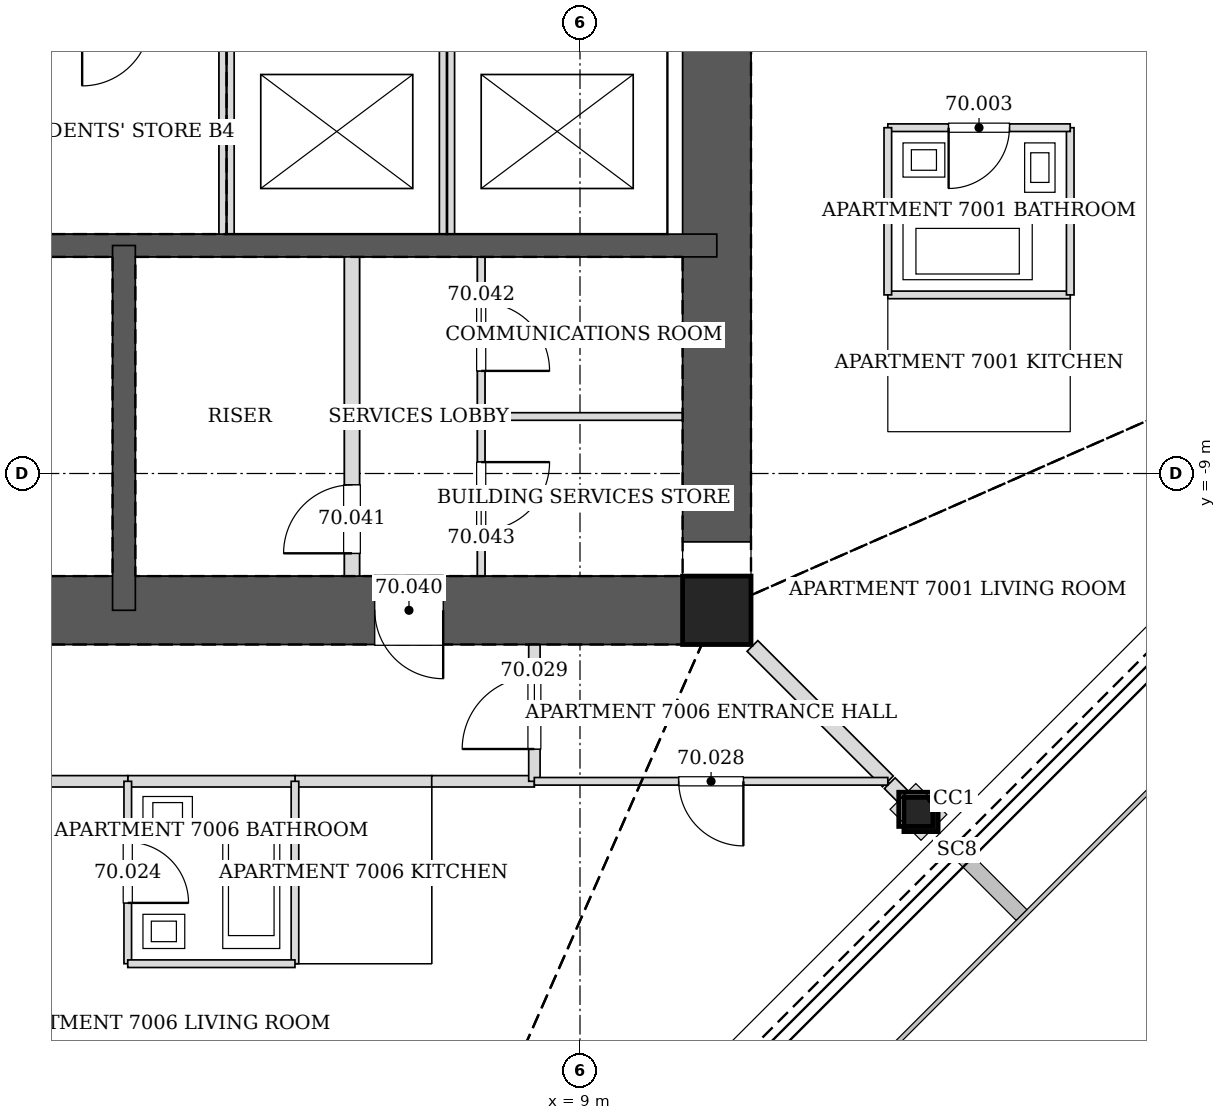
"""IFC4 building model, lengths in metres.
Left out: names, types, materials, properties, quantities, classifications, styles, units other than length and angle.
Written with IfcOpenShell. Run it as: python <this file> out.ifc"""

import sys

from ifc_helpers import new_model, si_unit, direction, frame, frame_2d, origin, origin_2d, place, context, subcontext, project, spatial, rectangle, hollow_rectangle, extrude, element, fill, save


model = new_model("IFC4")
c1 = context("Model", 3, precision=1e-05, world=origin(), true_north=direction((0.0, 1.0)))
c2 = subcontext(c1, "Body", "Model", "MODEL_VIEW")
j1 = project(units=[si_unit("LENGTHUNIT", "METRE"), si_unit("PLANEANGLEUNIT", "RADIAN")], contexts=[c1])
p1 = place(None, origin())
s1 = spatial("IfcSite", under=j1, at=p1, CompositionType="ELEMENT")
p2 = place(p1, origin())
s2 = spatial("IfcBuilding", under=s1, at=p2, CompositionType="ELEMENT")
p3 = place(p2, frame((0.0, 0.0, 287.8)))
s3 = spatial("IfcBuildingStorey", under=s2, at=p3, CompositionType="ELEMENT", Elevation=287.8)
p4 = place(p3, frame((13.487, -13.487, 0.0), z_axis=(-0.01995470925, 0.01995470925, 0.999601730269), x_axis=(-0.707106781187, -0.707106781187, 0.0)))
e1 = element("IfcColumn", 1, at=p4, inside=s3, PredefinedType="COLUMN", context=c2, shape_type="SweptSolid", body=[
    extrude(hollow_rectangle(XDim=0.45, YDim=0.45, WallThickness=0.02, at=origin_2d()), origin(), (0.0, 0.0, 1.0), 3.401),
])
p5 = place(p3, frame((10.8, -10.8, 0.0), z_axis=(0.0, 0.0, 1.0), x_axis=(1.0, 0.0, 0.0)))
e2 = element("IfcColumn", 2, at=p5, inside=s3, PredefinedType="COLUMN", context=c2, shape_type="SweptSolid", body=[
    extrude(hollow_rectangle(XDim=0.9, YDim=0.9, WallThickness=0.04, at=origin_2d()), origin(), (0.0, 0.0, 1.0), 3.4),
])
p6 = place(p3, frame((-10.8, -10.8, 0.0), z_axis=(0.0, 0.0, 1.0), x_axis=(1.0, 0.0, 0.0)))
e3 = element("IfcWall", 3, at=p6, inside=s3, PredefinedType="SOLIDWALL", context=c2, shape_type="SweptSolid", body=[
    extrude(rectangle(XDim=21.6, YDim=0.9, at=frame_2d((10.8, 0.0))), origin(), (0.0, 0.0, 1.0), 3.4),
])
p7 = place(p6, frame((10.05, 0.0, 0.0)))
e4 = element("IfcOpeningElement", 4, at=p7, cuts=e3, PredefinedType="OPENING", context=c2, shape_type="SweptSolid", body=[
    extrude(rectangle(XDim=1.5, YDim=2.1, at=frame_2d((0.75, 1.05))), frame((0.0, 0.46, 0.0), z_axis=(0.0, -1.0, 0.0), x_axis=(1.0, 0.0, 0.0)), (0.0, 0.0, 1.0), 0.92),
])
p8 = place(p6, frame((17.1, 0.0, 0.0)))
e5 = element("IfcOpeningElement", 5, at=p8, cuts=e3, PredefinedType="OPENING", context=c2, shape_type="SweptSolid", body=[
    extrude(rectangle(XDim=0.9, YDim=2.1, at=frame_2d((0.45, 1.05))), frame((0.0, 0.46, 0.0), z_axis=(0.0, -1.0, 0.0), x_axis=(1.0, 0.0, 0.0)), (0.0, 0.0, 1.0), 0.92),
])
p9 = place(p3, frame((10.8, -10.8, 0.0), z_axis=(0.0, 0.0, 1.0), x_axis=(0.0, 1.0, 0.0)))
e6 = element("IfcWall", 6, at=p9, inside=s3, PredefinedType="SOLIDWALL", context=c2, shape_type="SweptSolid", body=[
    extrude(rectangle(XDim=21.6, YDim=0.9, at=frame_2d((10.8, 0.0))), origin(), (0.0, 0.0, 1.0), 3.4),
])
p10 = place(p9, frame((11.7, 0.0, 0.0)))
e7 = element("IfcOpeningElement", 7, at=p10, cuts=e6, PredefinedType="OPENING", context=c2, shape_type="SweptSolid", body=[
    extrude(rectangle(XDim=1.2, YDim=2.1, at=frame_2d((0.6, 1.05))), frame((0.0, 0.46, 0.0), z_axis=(0.0, -1.0, 0.0), x_axis=(1.0, 0.0, 0.0)), (0.0, 0.0, 1.0), 0.92),
])
p11 = place(p9, frame((8.7, 0.0, 0.0)))
e8 = element("IfcOpeningElement", 8, at=p11, cuts=e6, PredefinedType="OPENING", context=c2, shape_type="SweptSolid", body=[
    extrude(rectangle(XDim=1.2, YDim=2.1, at=frame_2d((0.6, 1.05))), frame((0.0, 0.46, 0.0), z_axis=(0.0, -1.0, 0.0), x_axis=(1.0, 0.0, 0.0)), (0.0, 0.0, 1.0), 0.92),
])
p12 = place(p3, frame((-10.8, -6.0, 0.0), z_axis=(0.0, 0.0, 1.0), x_axis=(1.0, 0.0, 0.0)))
e9 = element("IfcWall", 9, at=p12, inside=s3, PredefinedType="SOLIDWALL", context=c2, shape_type="SweptSolid", body=[
    extrude(rectangle(XDim=21.6, YDim=0.3, at=frame_2d((10.8, 0.0))), origin(), (0.0, 0.0, 1.0), 3.4),
])
p13 = place(p12, frame((10.25, 0.0, 0.0)))
e10 = element("IfcOpeningElement", 10, at=p13, cuts=e9, PredefinedType="OPENING", context=c2, shape_type="SweptSolid", body=[
    extrude(rectangle(XDim=1.1, YDim=2.1, at=frame_2d((0.55, 1.05))), frame((0.0, 0.16, 0.0), z_axis=(0.0, -1.0, 0.0), x_axis=(1.0, 0.0, 0.0)), (0.0, 0.0, 1.0), 0.32),
])
p14 = place(p3, frame((3.0, -6.0, 0.0), z_axis=(0.0, 0.0, 1.0), x_axis=(0.0, -1.0, 0.0)))
e11 = element("IfcWall", 11, at=p14, inside=s3, PredefinedType="SOLIDWALL", context=c2, shape_type="SweptSolid", body=[
    extrude(rectangle(XDim=4.8, YDim=0.3, at=frame_2d((2.4, 0.0))), origin(), (0.0, 0.0, 1.0), 3.4),
])
p15 = place(p3, frame((5.249, -13.05, 0.0), z_axis=(0.0, 0.0, 1.0), x_axis=(1.0, 0.0, 0.0)))
e12 = element("IfcWall", 12, at=p15, inside=s3, PredefinedType="PARTITIONING", context=c2, shape_type="SweptSolid", body=[
    extrude(rectangle(XDim=1.802, YDim=0.15, at=frame_2d((0.901, 0.0))), origin(), (0.0, 0.0, 1.0), 3.2),
])
p16 = place(p3, frame((3.049, -13.05, 0.0), z_axis=(0.0, 0.0, 1.0), x_axis=(1.0, 0.0, 0.0)))
e13 = element("IfcWall", 13, at=p16, inside=s3, PredefinedType="PARTITIONING", context=c2, shape_type="SweptSolid", body=[
    extrude(rectangle(XDim=2.202, YDim=0.15, at=frame_2d((1.101, 0.0))), origin(), (0.0, 0.0, 1.0), 3.2),
])
p17 = place(p3, frame((-6.751, -13.05, 0.0), z_axis=(0.0, 0.0, 1.0), x_axis=(1.0, 0.0, 0.0)))
e14 = element("IfcWall", 14, at=p17, inside=s3, PredefinedType="PARTITIONING", context=c2, shape_type="SweptSolid", body=[
    extrude(rectangle(XDim=9.802, YDim=0.15, at=frame_2d((4.901, 0.0))), origin(), (0.0, 0.0, 1.0), 2.349),
])
p18 = place(p3, frame((7.049, -13.05, 0.0), z_axis=(0.0, 0.0, 1.0), x_axis=(1.0, 0.0, 0.0)))
e15 = element("IfcWall", 15, at=p18, inside=s3, PredefinedType="PARTITIONING", context=c2, shape_type="SweptSolid", body=[
    extrude(rectangle(XDim=1.351, YDim=0.15, at=frame_2d((0.675, 0.0))), origin(), (0.0, 0.0, 1.0), 3.2),
])
p19 = place(p3, frame((8.4, -13.05, 0.0), z_axis=(0.0, 0.0, 1.0), x_axis=(0.0, 1.0, 0.0)))
e16 = element("IfcWall", 16, at=p19, inside=s3, PredefinedType="PARTITIONING", context=c2, shape_type="SweptSolid", body=[
    extrude(rectangle(XDim=1.8, YDim=0.15, at=frame_2d((0.9, 0.0))), origin(), (0.0, 0.0, 1.0), 3.2),
])
p20 = place(p19, frame((0.425, 0.0, 0.0)))
e17 = element("IfcOpeningElement", 17, at=p20, cuts=e16, PredefinedType="OPENING", context=c2, shape_type="SweptSolid", body=[
    extrude(rectangle(XDim=0.95, YDim=2.1, at=frame_2d((0.475, 1.05))), frame((0.0, 0.085, 0.0), z_axis=(0.0, -1.0, 0.0), x_axis=(1.0, 0.0, 0.0)), (0.0, 0.0, 1.0), 0.17),
])
p21 = place(p3, frame((15.45, -6.65, 0.0), z_axis=(0.0, 0.0, 1.0), x_axis=(-1.0, 0.0, 0.0)))
e18 = element("IfcWall", 18, at=p21, inside=s3, PredefinedType="PARTITIONING", context=c2, shape_type="SweptSolid", body=[
    extrude(rectangle(XDim=2.4, YDim=0.1, at=frame_2d((1.2, 0.0))), origin(), (0.0, 0.0, 1.0), 2.591),
])
p22 = place(p3, frame((15.45, -6.65, 0.0), z_axis=(0.0, 0.0, 1.0), x_axis=(0.0, 1.0, 0.0)))
e19 = element("IfcWall", 19, at=p22, inside=s3, PredefinedType="PARTITIONING", context=c2, shape_type="SweptSolid", body=[
    extrude(rectangle(XDim=2.2, YDim=0.1, at=frame_2d((1.1, 0.0))), origin(), (0.0, 0.0, 1.0), 3.2),
])
p23 = place(p3, frame((15.45, -4.45, 0.0), z_axis=(0.0, 0.0, 1.0), x_axis=(-1.0, 0.0, 0.0)))
e20 = element("IfcWall", 20, at=p23, inside=s3, PredefinedType="PARTITIONING", context=c2, shape_type="SweptSolid", body=[
    extrude(rectangle(XDim=2.4, YDim=0.1, at=frame_2d((1.2, 0.0))), origin(), (0.0, 0.0, 1.0), 2.591),
])
p24 = place(p23, frame((0.8, 0.0, 0.0)))
e21 = element("IfcOpeningElement", 21, at=p24, cuts=e20, PredefinedType="OPENING", context=c2, shape_type="SweptSolid", body=[
    extrude(rectangle(XDim=0.8, YDim=2.1, at=frame_2d((0.4, 1.05))), frame((0.0, 0.06, 0.0), z_axis=(0.0, -1.0, 0.0), x_axis=(1.0, 0.0, 0.0)), (0.0, 0.0, 1.0), 0.12),
])
p25 = place(p3, frame((13.05, -4.45, 0.0), z_axis=(0.0, 0.0, 1.0), x_axis=(0.0, -1.0, 0.0)))
e22 = element("IfcWall", 22, at=p25, inside=s3, PredefinedType="PARTITIONING", context=c2, shape_type="SweptSolid", body=[
    extrude(rectangle(XDim=2.2, YDim=0.1, at=frame_2d((1.1, 0.0))), origin(), (0.0, 0.0, 1.0), 3.2),
])
p26 = place(p3, frame((13.075, -13.075, 0.0), z_axis=(0.0, 0.0, 1.0), x_axis=(0.707106781187, -0.707106781187, 0.0)))
e23 = element("IfcWall", 23, at=p26, inside=s3, PredefinedType="PARTITIONING", context=c2, shape_type="SweptSolid", body=[
    extrude(rectangle(XDim=0.242, YDim=0.2, at=frame_2d((0.121, 0.0))), origin(), (0.0, 0.0, 1.0), 2.591),
])
p27 = place(p3, frame((11.269, -11.269, 0.0), z_axis=(0.0, 0.0, 1.0), x_axis=(0.707106781187, -0.707106781187, 0.0)))
e24 = element("IfcWall", 24, at=p27, inside=s3, PredefinedType="PARTITIONING", context=c2, shape_type="SweptSolid", body=[
    extrude(rectangle(XDim=2.52, YDim=0.2, at=frame_2d((1.26, 0.0))), origin(), (0.0, 0.0, 1.0), 2.591),
])
p28 = place(p3, frame((5.25, -13.05, 0.0), z_axis=(0.0, 0.0, 1.0), x_axis=(0.0, -1.0, 0.0)))
e25 = element("IfcWall", 25, at=p28, inside=s3, PredefinedType="PARTITIONING", context=c2, shape_type="SweptSolid", body=[
    extrude(rectangle(XDim=2.4, YDim=0.1, at=frame_2d((1.2, 0.0))), origin(), (0.0, 0.0, 1.0), 2.591),
])
p29 = place(p3, frame((3.05, -13.05, 0.0), z_axis=(0.0, 0.0, 1.0), x_axis=(0.0, -1.0, 0.0)))
e26 = element("IfcWall", 26, at=p29, inside=s3, PredefinedType="PARTITIONING", context=c2, shape_type="SweptSolid", body=[
    extrude(rectangle(XDim=2.4, YDim=0.1, at=frame_2d((1.2, 0.0))), origin(), (0.0, 0.0, 1.0), 2.591),
])
p30 = place(p29, frame((0.8, 0.0, 0.0)))
e27 = element("IfcOpeningElement", 27, at=p30, cuts=e26, PredefinedType="OPENING", context=c2, shape_type="SweptSolid", body=[
    extrude(rectangle(XDim=0.8, YDim=2.1, at=frame_2d((0.4, 1.05))), frame((0.0, 0.06, 0.0), z_axis=(0.0, -1.0, 0.0), x_axis=(1.0, 0.0, 0.0)), (0.0, 0.0, 1.0), 0.12),
])
p31 = place(p3, frame((3.05, -15.45, 0.0), z_axis=(0.0, 0.0, 1.0), x_axis=(1.0, 0.0, 0.0)))
e28 = element("IfcWall", 28, at=p31, inside=s3, PredefinedType="PARTITIONING", context=c2, shape_type="SweptSolid", body=[
    extrude(rectangle(XDim=2.2, YDim=0.1, at=frame_2d((1.1, 0.0))), origin(), (0.0, 0.0, 1.0), 3.2),
])
p32 = place(p3, frame((13.05, -13.05, 0.0), z_axis=(0.0, 0.0, 1.0), x_axis=(-1.0, 0.0, 0.0)))
e29 = element("IfcWall", 29, at=p32, inside=s3, PredefinedType="PARTITIONING", context=c2, shape_type="SweptSolid", body=[
    extrude(rectangle(XDim=4.651, YDim=0.1, at=frame_2d((2.326, 0.0))), origin(), (0.0, 0.0, 1.0), 2.497),
])
p33 = place(p32, frame((1.9, 0.0, 0.0)))
e30 = element("IfcOpeningElement", 30, at=p33, cuts=e29, PredefinedType="OPENING", context=c2, shape_type="SweptSolid", body=[
    extrude(rectangle(XDim=0.85, YDim=2.1, at=frame_2d((0.425, 1.05))), frame((0.0, 0.06, 0.0), z_axis=(0.0, -1.0, 0.0), x_axis=(1.0, 0.0, 0.0)), (0.0, 0.0, 1.0), 0.12),
])
p34 = place(p3, frame((4.35, -5.85, 0.0), z_axis=(0.0, 0.0, 1.0), x_axis=(0.0, 1.0, 0.0)))
e31 = element("IfcWall", 31, at=p34, inside=s3, PredefinedType="PARTITIONING", context=c2, shape_type="SweptSolid", body=[
    extrude(rectangle(XDim=2.7, YDim=0.2, at=frame_2d((1.35, 0.0))), origin(), (0.0, 0.0, 1.0), 3.2),
])
p35 = place(p3, frame((7.25, -5.85, 0.0), z_axis=(0.0, 0.0, 1.0), x_axis=(0.0, 1.0, 0.0)))
e32 = element("IfcWall", 32, at=p35, inside=s3, PredefinedType="PARTITIONING", context=c2, shape_type="SweptSolid", body=[
    extrude(rectangle(XDim=2.7, YDim=0.2, at=frame_2d((1.35, 0.0))), origin(), (0.0, 0.0, 1.0), 3.4),
])
p36 = place(p3, frame((6.0, -10.35, 0.0), z_axis=(0.0, 0.0, 1.0), x_axis=(0.0, 1.0, 0.0)))
e33 = element("IfcWall", 33, at=p36, inside=s3, PredefinedType="PARTITIONING", context=c2, shape_type="SweptSolid", body=[
    extrude(rectangle(XDim=4.2, YDim=0.2, at=frame_2d((2.1, 0.0))), origin(), (0.0, 0.0, 1.0), 3.2),
])
p37 = place(p36, frame((0.3, 0.0, 0.0)))
e34 = element("IfcOpeningElement", 34, at=p37, cuts=e33, PredefinedType="OPENING", context=c2, shape_type="SweptSolid", body=[
    extrude(rectangle(XDim=0.9, YDim=2.1, at=frame_2d((0.45, 1.05))), frame((0.0, 0.11, 0.0), z_axis=(0.0, -1.0, 0.0), x_axis=(1.0, 0.0, 0.0)), (0.0, 0.0, 1.0), 0.22),
])
p38 = place(p3, frame((7.7, -10.35, 0.0), z_axis=(0.0, 0.0, 1.0), x_axis=(0.0, 1.0, 0.0)))
e35 = element("IfcWall", 35, at=p38, inside=s3, PredefinedType="PARTITIONING", context=c2, shape_type="SweptSolid", body=[
    extrude(rectangle(XDim=4.2, YDim=0.1, at=frame_2d((2.1, 0.0))), origin(), (0.0, 0.0, 1.0), 3.2),
])
p39 = place(p38, frame((2.7, 0.0, 0.0)))
e36 = element("IfcOpeningElement", 36, at=p39, cuts=e35, PredefinedType="OPENING", context=c2, shape_type="SweptSolid", body=[
    extrude(rectangle(XDim=0.9, YDim=2.1, at=frame_2d((0.45, 1.05))), frame((0.0, 0.06, 0.0), z_axis=(0.0, -1.0, 0.0), x_axis=(1.0, 0.0, 0.0)), (0.0, 0.0, 1.0), 0.12),
])
p40 = place(p38, frame((0.6, 0.0, 0.0)))
e37 = element("IfcOpeningElement", 37, at=p40, cuts=e35, PredefinedType="OPENING", context=c2, shape_type="SweptSolid", body=[
    extrude(rectangle(XDim=0.9, YDim=2.1, at=frame_2d((0.45, 1.05))), frame((0.0, 0.06, 0.0), z_axis=(0.0, -1.0, 0.0), x_axis=(1.0, 0.0, 0.0)), (0.0, 0.0, 1.0), 0.12),
])
p41 = place(p3, frame((7.7, -8.25, 0.0), z_axis=(0.0, 0.0, 1.0), x_axis=(1.0, 0.0, 0.0)))
e38 = element("IfcWall", 38, at=p41, inside=s3, PredefinedType="PARTITIONING", context=c2, shape_type="SweptSolid", body=[
    extrude(rectangle(XDim=2.65, YDim=0.1, at=frame_2d((1.325, 0.0))), origin(), (0.0, 0.0, 1.0), 3.2),
])
p42 = place(p24, origin())
e39 = element("IfcDoor", 39, at=p42, inside=s3, OperationType="SINGLE_SWING_RIGHT", PredefinedType="DOOR", context=c2, shape_type="SweptSolid", body=[
    extrude(rectangle(XDim=0.8, YDim=2.1, at=frame_2d((0.4, 1.05))), frame((0.0, 0.025, 0.0), z_axis=(0.0, -1.0, 0.0), x_axis=(1.0, 0.0, 0.0)), (0.0, 0.0, 1.0), 0.05),
])
fill(e21, e39)
p43 = place(p30, origin())
e40 = element("IfcDoor", 40, at=p43, inside=s3, OperationType="SINGLE_SWING_RIGHT", PredefinedType="DOOR", context=c2, shape_type="SweptSolid", body=[
    extrude(rectangle(XDim=0.8, YDim=2.1, at=frame_2d((0.4, 1.05))), frame((0.0, 0.025, 0.0), z_axis=(0.0, -1.0, 0.0), x_axis=(1.0, 0.0, 0.0)), (0.0, 0.0, 1.0), 0.05),
])
fill(e27, e40)
p44 = place(p33, origin())
e41 = element("IfcDoor", 41, at=p44, inside=s3, OperationType="SINGLE_SWING_LEFT", PredefinedType="DOOR", context=c2, shape_type="SweptSolid", body=[
    extrude(rectangle(XDim=0.85, YDim=2.1, at=frame_2d((0.425, 1.05))), frame((0.0, 0.025, 0.0), z_axis=(0.0, -1.0, 0.0), x_axis=(1.0, 0.0, 0.0)), (0.0, 0.0, 1.0), 0.05),
])
fill(e30, e41)
p45 = place(p20, origin())
e42 = element("IfcDoor", 42, at=p45, inside=s3, OperationType="SINGLE_SWING_LEFT", PredefinedType="DOOR", context=c2, shape_type="SweptSolid", body=[
    extrude(rectangle(XDim=0.95, YDim=2.1, at=frame_2d((0.475, 1.05))), frame((0.0, 0.025, 0.0), z_axis=(0.0, -1.0, 0.0), x_axis=(1.0, 0.0, 0.0)), (0.0, 0.0, 1.0), 0.05),
])
fill(e17, e42)
p46 = place(p8, frame((0.9, 0.0, 0.0), z_axis=(0.0, 0.0, 1.0), x_axis=(-1.0, 0.0, 0.0)))
e43 = element("IfcDoor", 43, at=p46, inside=s3, OperationType="SINGLE_SWING_LEFT", PredefinedType="DOOR", context=c2, shape_type="SweptSolid", body=[
    extrude(rectangle(XDim=0.9, YDim=2.1, at=frame_2d((0.45, 1.05))), frame((0.0, 0.025, 0.0), z_axis=(0.0, -1.0, 0.0), x_axis=(1.0, 0.0, 0.0)), (0.0, 0.0, 1.0), 0.05),
])
fill(e5, e43)
p47 = place(p37, origin())
e44 = element("IfcDoor", 44, at=p47, inside=s3, OperationType="SINGLE_SWING_LEFT", PredefinedType="DOOR", context=c2, shape_type="SweptSolid", body=[
    extrude(rectangle(XDim=0.9, YDim=2.1, at=frame_2d((0.45, 1.05))), frame((0.0, 0.025, 0.0), z_axis=(0.0, -1.0, 0.0), x_axis=(1.0, 0.0, 0.0)), (0.0, 0.0, 1.0), 0.05),
])
fill(e34, e44)
p48 = place(p39, frame((0.9, 0.0, 0.0), z_axis=(0.0, 0.0, 1.0), x_axis=(-1.0, 0.0, 0.0)))
e45 = element("IfcDoor", 45, at=p48, inside=s3, OperationType="SINGLE_SWING_RIGHT", PredefinedType="DOOR", context=c2, shape_type="SweptSolid", body=[
    extrude(rectangle(XDim=0.9, YDim=2.1, at=frame_2d((0.45, 1.05))), frame((0.0, 0.025, 0.0), z_axis=(0.0, -1.0, 0.0), x_axis=(1.0, 0.0, 0.0)), (0.0, 0.0, 1.0), 0.05),
])
fill(e36, e45)
p49 = place(p40, frame((0.9, 0.0, 0.0), z_axis=(0.0, 0.0, 1.0), x_axis=(-1.0, 0.0, 0.0)))
e46 = element("IfcDoor", 46, at=p49, inside=s3, OperationType="SINGLE_SWING_LEFT", PredefinedType="DOOR", context=c2, shape_type="SweptSolid", body=[
    extrude(rectangle(XDim=0.9, YDim=2.1, at=frame_2d((0.45, 1.05))), frame((0.0, 0.025, 0.0), z_axis=(0.0, -1.0, 0.0), x_axis=(1.0, 0.0, 0.0)), (0.0, 0.0, 1.0), 0.05),
])
fill(e37, e46)
save(model, sys.argv[1])
